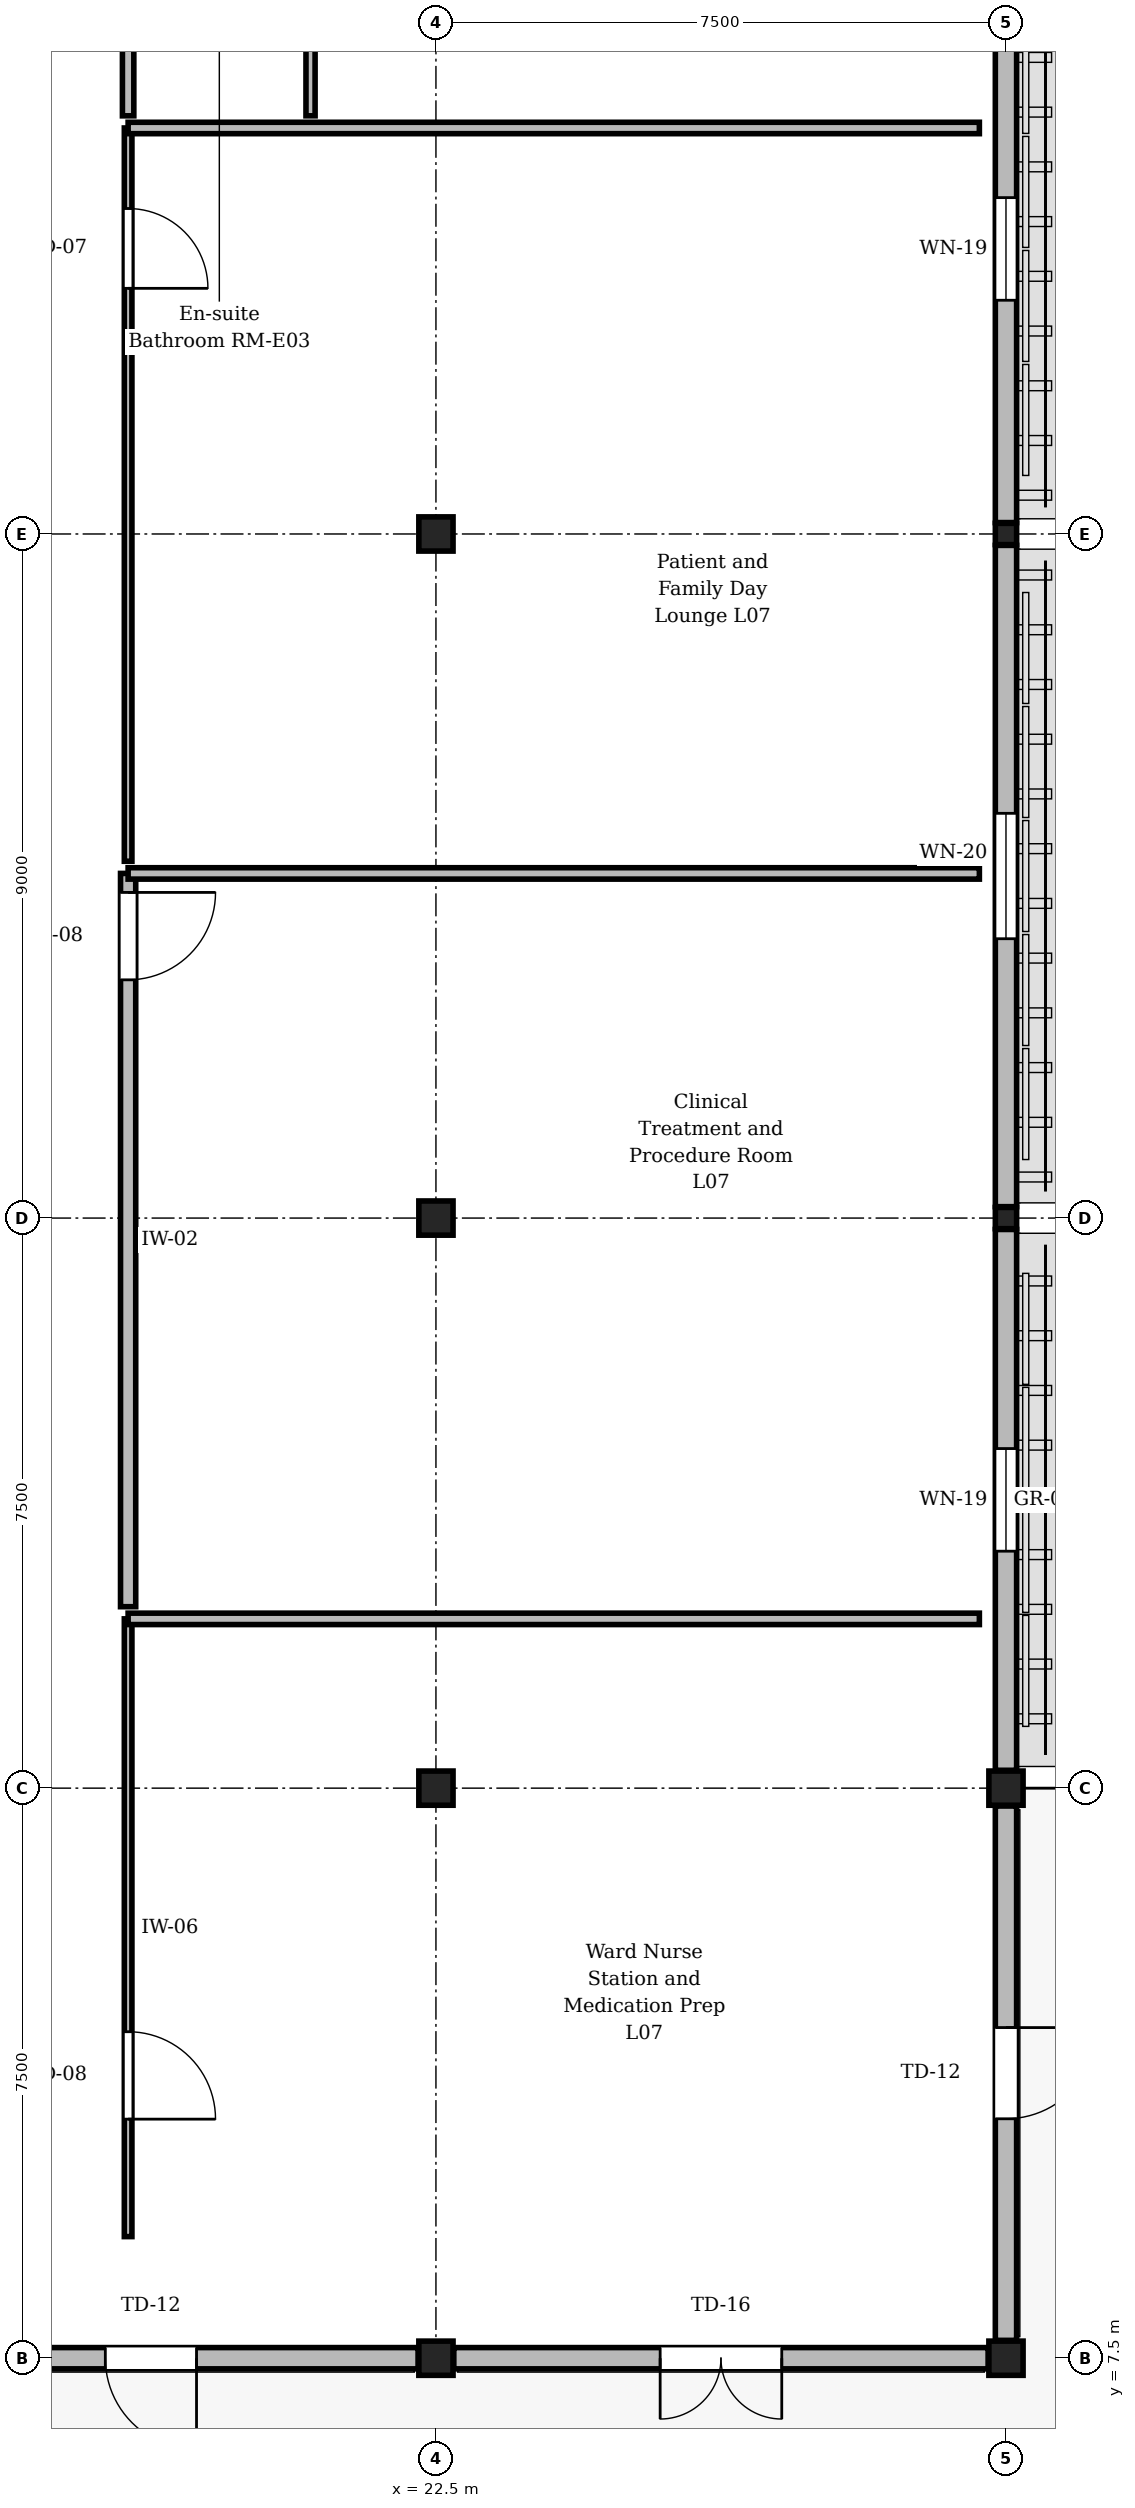
"""IFC4 building model, lengths in metres.
Left out: names, types, materials, properties, quantities, classifications, styles, units other than length and angle.
Written with IfcOpenShell. Run it as: python <this file> out.ifc"""

import sys

from ifc_helpers import new_model, si_unit, direction, frame, frame_2d, origin, origin_2d, place, context, subcontext, project, spatial, rectangle, extrude, element, fill, save


model = new_model("IFC4")
c1 = context("Model", 3, precision=1e-05, world=origin(), true_north=direction((0.0, 1.0)))
c2 = subcontext(c1, "Body", "Model", "MODEL_VIEW")
j1 = project(units=[si_unit("LENGTHUNIT", "METRE"), si_unit("PLANEANGLEUNIT", "RADIAN")], contexts=[c1])
p1 = place(None, origin())
s1 = spatial("IfcSite", under=j1, at=p1, CompositionType="ELEMENT")
p2 = place(p1, origin())
s2 = spatial("IfcBuilding", under=s1, at=p2, CompositionType="ELEMENT")
p3 = place(p2, frame((0.0, 0.0, 30.0)))
s3 = spatial("IfcBuildingStorey", under=s2, at=p3, CompositionType="ELEMENT", Elevation=30.0)
for number, where, z_axis, x_axis in (
    (1, (22.5, 7.5, 0.0), (0.0, 0.0, 1.0), (1.0, 0.0, 0.0)),
    (2, (22.5, 15.0, 0.0), (0.0, 0.0, 1.0), (1.0, 0.0, 0.0)),
    (3, (22.5, 22.5, 0.0), (0.0, 0.0, 1.0), (1.0, 0.0, 0.0)),
    (4, (22.5, 31.5, 0.0), (0.0, 0.0, 1.0), (1.0, 0.0, 0.0)),
    (5, (30.0, 7.5, 0.0), (0.0, 0.0, 1.0), (1.0, 0.0, 0.0)),
    (6, (30.0, 15.0, 0.0), (0.0, 0.0, 1.0), (1.0, 0.0, 0.0)),
):
    element("IfcColumn", number, at=place(p3, frame(where, z_axis=z_axis, x_axis=x_axis)), inside=s3, PredefinedType="COLUMN", context=c2, shape_type="SweptSolid", body=[
        extrude(rectangle(XDim=0.45, YDim=0.45, at=origin_2d()), origin(), (0.0, 0.0, 1.0), 4.05),
    ])
for number, where, z_axis, x_axis in (
    (7, (30.0, 22.5, 0.0), (0.0, 0.0, 1.0), (1.0, 0.0, 0.0)),
    (8, (30.0, 31.5, 0.0), (0.0, 0.0, 1.0), (1.0, 0.0, 0.0)),
):
    element("IfcColumn", number, at=place(p3, frame(where, z_axis=z_axis, x_axis=x_axis)), inside=s3, PredefinedType="COLUMN", context=c2, shape_type="SweptSolid", body=[
        extrude(rectangle(XDim=0.28, YDim=0.28, at=origin_2d()), origin(), (0.0, 0.0, 1.0), 4.05),
    ])
p4 = place(p3, frame((22.265, 7.5, 0.0), z_axis=(0.0, 0.0, 1.0), x_axis=(-1.0, 0.0, 0.0)))
e9 = element("IfcWall", 9, at=p4, inside=s3, PredefinedType="STANDARD", context=c2, shape_type="SweptSolid", body=[
    extrude(rectangle(XDim=7.03, YDim=0.28, at=frame_2d((3.515, 0.0))), origin(), (0.0, 0.0, 1.0), 3.23),
])
p5 = place(p4, frame((2.915, 0.0, 0.0)))
e10 = element("IfcOpeningElement", 10, at=p5, cuts=e9, PredefinedType="OPENING", context=c2, shape_type="SweptSolid", body=[
    extrude(rectangle(XDim=1.2, YDim=2.3, at=frame_2d((0.6, 1.15))), frame((0.0, 0.15, 0.0), z_axis=(0.0, -1.0, 0.0), x_axis=(1.0, 0.0, 0.0)), (0.0, 0.0, 1.0), 0.3),
])
p6 = place(p3, frame((29.765, 7.5, 0.0), z_axis=(0.0, 0.0, 1.0), x_axis=(-1.0, 0.0, 0.0)))
e11 = element("IfcWall", 11, at=p6, inside=s3, PredefinedType="STANDARD", context=c2, shape_type="SweptSolid", body=[
    extrude(rectangle(XDim=7.03, YDim=0.28, at=frame_2d((3.515, 0.0))), origin(), (0.0, 0.0, 1.0), 3.23),
])
p7 = place(p6, frame((2.715, 0.0, 0.0)))
e12 = element("IfcOpeningElement", 12, at=p7, cuts=e11, PredefinedType="OPENING", context=c2, shape_type="SweptSolid", body=[
    extrude(rectangle(XDim=1.6, YDim=2.35, at=frame_2d((0.8, 1.175))), frame((0.0, 0.15, 0.0), z_axis=(0.0, -1.0, 0.0), x_axis=(1.0, 0.0, 0.0)), (0.0, 0.0, 1.0), 0.3),
])
p8 = place(p3, frame((30.0, 14.765, 0.0), z_axis=(0.0, 0.0, 1.0), x_axis=(0.0, -1.0, 0.0)))
e13 = element("IfcWall", 13, at=p8, inside=s3, PredefinedType="STANDARD", context=c2, shape_type="SweptSolid", body=[
    extrude(rectangle(XDim=7.03, YDim=0.28, at=frame_2d((3.515, 0.0))), origin(), (0.0, 0.0, 1.0), 3.23),
])
p9 = place(p8, frame((2.915, 0.0, 0.0)))
e14 = element("IfcOpeningElement", 14, at=p9, cuts=e13, PredefinedType="OPENING", context=c2, shape_type="SweptSolid", body=[
    extrude(rectangle(XDim=1.2, YDim=2.3, at=frame_2d((0.6, 1.15))), frame((0.0, 0.15, 0.0), z_axis=(0.0, -1.0, 0.0), x_axis=(1.0, 0.0, 0.0)), (0.0, 0.0, 1.0), 0.3),
])
p10 = place(p3, frame((30.0, 22.35, 0.0), z_axis=(0.0, 0.0, 1.0), x_axis=(0.0, -1.0, 0.0)))
e15 = element("IfcWall", 15, at=p10, inside=s3, PredefinedType="STANDARD", context=c2, shape_type="SweptSolid", body=[
    extrude(rectangle(XDim=7.115, YDim=0.28, at=frame_2d((3.558, 0.0))), origin(), (0.0, 0.0, 1.0), 3.83),
])
p11 = place(p10, frame((2.883, 0.0, 0.85)))
e16 = element("IfcOpeningElement", 16, at=p11, cuts=e15, PredefinedType="OPENING", context=c2, shape_type="SweptSolid", body=[
    extrude(rectangle(XDim=1.35, YDim=2.25, at=frame_2d((0.675, 1.125))), frame((0.0, 0.15, 0.0), z_axis=(0.0, -1.0, 0.0), x_axis=(1.0, 0.0, 0.0)), (0.0, 0.0, 1.0), 0.3),
])
p12 = place(p3, frame((30.0, 31.35, 0.0), z_axis=(0.0, 0.0, 1.0), x_axis=(0.0, -1.0, 0.0)))
e17 = element("IfcWall", 17, at=p12, inside=s3, PredefinedType="STANDARD", context=c2, shape_type="SweptSolid", body=[
    extrude(rectangle(XDim=8.7, YDim=0.28, at=frame_2d((4.35, 0.0))), origin(), (0.0, 0.0, 1.0), 3.83),
])
p13 = place(p12, frame((3.525, 0.0, 0.85)))
e18 = element("IfcOpeningElement", 18, at=p13, cuts=e17, PredefinedType="OPENING", context=c2, shape_type="SweptSolid", body=[
    extrude(rectangle(XDim=1.65, YDim=2.25, at=frame_2d((0.825, 1.125))), frame((0.0, 0.15, 0.0), z_axis=(0.0, -1.0, 0.0), x_axis=(1.0, 0.0, 0.0)), (0.0, 0.0, 1.0), 0.3),
])
p14 = place(p3, frame((30.0, 38.85, 0.0), z_axis=(0.0, 0.0, 1.0), x_axis=(0.0, -1.0, 0.0)))
e19 = element("IfcWall", 19, at=p14, inside=s3, PredefinedType="STANDARD", context=c2, shape_type="SweptSolid", body=[
    extrude(rectangle(XDim=7.2, YDim=0.28, at=frame_2d((3.6, 0.0))), origin(), (0.0, 0.0, 1.0), 3.83),
])
p15 = place(p14, frame((2.925, 0.0, 0.85)))
e20 = element("IfcOpeningElement", 20, at=p15, cuts=e19, PredefinedType="OPENING", context=c2, shape_type="SweptSolid", body=[
    extrude(rectangle(XDim=1.35, YDim=2.25, at=frame_2d((0.675, 1.125))), frame((0.0, 0.15, 0.0), z_axis=(0.0, -1.0, 0.0), x_axis=(1.0, 0.0, 0.0)), (0.0, 0.0, 1.0), 0.3),
])
p16 = place(p3, frame((18.45, 17.227, 0.0), z_axis=(0.0, 0.0, 1.0), x_axis=(0.0, -1.0, 0.0)))
e21 = element("IfcWall", 21, at=p16, inside=s3, PredefinedType="PARTITIONING", context=c2, shape_type="SweptSolid", body=[
    extrude(rectangle(XDim=8.127, YDim=0.1, at=frame_2d((4.063, 0.0))), origin(), (0.0, 0.0, 1.0), 3.815),
])
p17 = place(p16, frame((5.432, 0.0, 0.0)))
e22 = element("IfcOpeningElement", 22, at=p17, cuts=e21, PredefinedType="OPENING", context=c2, shape_type="SweptSolid", body=[
    extrude(rectangle(XDim=1.15, YDim=2.2, at=frame_2d((0.575, 1.1))), frame((0.0, 0.06, 0.0), z_axis=(0.0, -1.0, 0.0), x_axis=(1.0, 0.0, 0.0)), (0.0, 0.0, 1.0), 0.12),
])
p18 = place(p3, frame((18.45, 27.034, 0.0), z_axis=(0.0, 0.0, 1.0), x_axis=(0.0, -1.0, 0.0)))
e23 = element("IfcWall", 23, at=p18, inside=s3, PredefinedType="STANDARD", context=c2, shape_type="SweptSolid", body=[
    extrude(rectangle(XDim=9.647, YDim=0.2, at=frame_2d((4.823, 0.0))), origin(), (0.0, 0.0, 1.0), 3.815),
])
p19 = place(p18, frame((0.25, 0.0, 0.0)))
e24 = element("IfcOpeningElement", 24, at=p19, cuts=e23, PredefinedType="OPENING", context=c2, shape_type="SweptSolid", body=[
    extrude(rectangle(XDim=1.15, YDim=2.2, at=frame_2d((0.575, 1.1))), frame((0.0, 0.11, 0.0), z_axis=(0.0, -1.0, 0.0), x_axis=(1.0, 0.0, 0.0)), (0.0, 0.0, 1.0), 0.22),
])
p20 = place(p3, frame((18.45, 36.841, 0.0), z_axis=(0.0, 0.0, 1.0), x_axis=(0.0, -1.0, 0.0)))
e25 = element("IfcWall", 25, at=p20, inside=s3, PredefinedType="PARTITIONING", context=c2, shape_type="SweptSolid", body=[
    extrude(rectangle(XDim=9.647, YDim=0.1, at=frame_2d((4.823, 0.0))), origin(), (0.0, 0.0, 1.0), 3.815),
])
p21 = place(p20, frame((1.06, 0.0, 0.0)))
e26 = element("IfcOpeningElement", 26, at=p21, cuts=e25, PredefinedType="OPENING", context=c2, shape_type="SweptSolid", body=[
    extrude(rectangle(XDim=1.05, YDim=2.2, at=frame_2d((0.525, 1.1))), frame((0.0, 0.06, 0.0), z_axis=(0.0, -1.0, 0.0), x_axis=(1.0, 0.0, 0.0)), (0.0, 0.0, 1.0), 0.12),
])
p22 = place(p3, frame((18.45, 46.649, 0.0), z_axis=(0.0, 0.0, 1.0), x_axis=(0.0, -1.0, 0.0)))
e27 = element("IfcWall", 27, at=p22, inside=s3, PredefinedType="PARTITIONING", context=c2, shape_type="SweptSolid", body=[
    extrude(rectangle(XDim=9.647, YDim=0.15, at=frame_2d((4.824, 0.0))), origin(), (0.0, 0.0, 1.0), 3.815),
])
p23 = place(p22, frame((3.369, 0.0, 0.0)))
e28 = element("IfcOpeningElement", 28, at=p23, cuts=e27, PredefinedType="OPENING", context=c2, shape_type="SweptSolid", body=[
    extrude(rectangle(XDim=1.35, YDim=2.25, at=frame_2d((0.675, 1.125))), frame((0.0, 0.085, 0.0), z_axis=(0.0, -1.0, 0.0), x_axis=(1.0, 0.0, 0.0)), (0.0, 0.0, 1.0), 0.17),
])
p24 = place(p3, frame((20.85, 37.001, 0.0), z_axis=(0.0, 0.0, 1.0), x_axis=(0.0, 1.0, 0.0)))
e29 = element("IfcWall", 29, at=p24, inside=s3, PredefinedType="PARTITIONING", context=c2, shape_type="SweptSolid", body=[
    extrude(rectangle(XDim=2.0, YDim=0.12, at=frame_2d((1.0, 0.0))), origin(), (0.0, 0.0, 1.0), 3.815),
])
for number, where, z_axis, x_axis in (
    (30, (18.45, 17.227, 0.0), (0.0, 0.0, 1.0), (1.0, 0.0, 0.0)),
    (31, (18.45, 27.034, 0.0), (0.0, 0.0, 1.0), (1.0, 0.0, 0.0)),
    (32, (18.45, 36.841, 0.0), (0.0, 0.0, 1.0), (1.0, 0.0, 0.0)),
):
    element("IfcWall", number, at=place(p3, frame(where, z_axis=z_axis, x_axis=x_axis)), inside=s3, PredefinedType="PARTITIONING", context=c2, shape_type="SweptSolid", body=[
        extrude(rectangle(XDim=11.2, YDim=0.15, at=frame_2d((5.6, 0.0))), origin(), (0.0, 0.0, 1.0), 3.815),
    ])
p25 = place(p5, origin())
e33 = element("IfcDoor", 33, at=p25, inside=s3, OperationType="SINGLE_SWING_LEFT", PredefinedType="DOOR", context=c2, shape_type="SweptSolid", body=[
    extrude(rectangle(XDim=1.2, YDim=2.3, at=frame_2d((0.6, 1.15))), frame((0.0, 0.025, 0.0), z_axis=(0.0, -1.0, 0.0), x_axis=(1.0, 0.0, 0.0)), (0.0, 0.0, 1.0), 0.05),
])
fill(e10, e33)
p26 = place(p7, origin())
e34 = element("IfcDoor", 34, at=p26, inside=s3, OperationType="DOUBLE_DOOR_SINGLE_SWING", PredefinedType="DOOR", context=c2, shape_type="SweptSolid", body=[
    extrude(rectangle(XDim=1.6, YDim=2.35, at=frame_2d((0.8, 1.175))), frame((0.0, 0.025, 0.0), z_axis=(0.0, -1.0, 0.0), x_axis=(1.0, 0.0, 0.0)), (0.0, 0.0, 1.0), 0.05),
])
fill(e12, e34)
p27 = place(p9, origin())
e35 = element("IfcDoor", 35, at=p27, inside=s3, OperationType="SINGLE_SWING_LEFT", PredefinedType="DOOR", context=c2, shape_type="SweptSolid", body=[
    extrude(rectangle(XDim=1.2, YDim=2.3, at=frame_2d((0.6, 1.15))), frame((0.0, 0.025, 0.0), z_axis=(0.0, -1.0, 0.0), x_axis=(1.0, 0.0, 0.0)), (0.0, 0.0, 1.0), 0.05),
])
fill(e14, e35)
p28 = place(p11, origin())
e36 = element("IfcWindow", 36, at=p28, inside=s3, PartitioningType="SINGLE_PANEL", PredefinedType="WINDOW", context=c2, shape_type="SweptSolid", body=[
    extrude(rectangle(XDim=1.35, YDim=2.25, at=frame_2d((0.675, 1.125))), frame((0.0, 0.03, 0.0), z_axis=(0.0, -1.0, 0.0), x_axis=(1.0, 0.0, 0.0)), (0.0, 0.0, 1.0), 0.06),
])
fill(e16, e36)
p29 = place(p13, origin())
e37 = element("IfcWindow", 37, at=p29, inside=s3, PartitioningType="SINGLE_PANEL", PredefinedType="WINDOW", context=c2, shape_type="SweptSolid", body=[
    extrude(rectangle(XDim=1.65, YDim=2.25, at=frame_2d((0.825, 1.125))), frame((0.0, 0.03, 0.0), z_axis=(0.0, -1.0, 0.0), x_axis=(1.0, 0.0, 0.0)), (0.0, 0.0, 1.0), 0.06),
])
fill(e18, e37)
p30 = place(p15, origin())
e38 = element("IfcWindow", 38, at=p30, inside=s3, PartitioningType="SINGLE_PANEL", PredefinedType="WINDOW", context=c2, shape_type="SweptSolid", body=[
    extrude(rectangle(XDim=1.35, YDim=2.25, at=frame_2d((0.675, 1.125))), frame((0.0, 0.03, 0.0), z_axis=(0.0, -1.0, 0.0), x_axis=(1.0, 0.0, 0.0)), (0.0, 0.0, 1.0), 0.06),
])
fill(e20, e38)
p31 = place(p17, origin())
e39 = element("IfcDoor", 39, at=p31, inside=s3, OperationType="SINGLE_SWING_RIGHT", PredefinedType="DOOR", context=c2, shape_type="SweptSolid", body=[
    extrude(rectangle(XDim=1.15, YDim=2.2, at=frame_2d((0.575, 1.1))), frame((0.0, 0.025, 0.0), z_axis=(0.0, -1.0, 0.0), x_axis=(1.0, 0.0, 0.0)), (0.0, 0.0, 1.0), 0.05),
])
fill(e22, e39)
p32 = place(p19, origin())
e40 = element("IfcDoor", 40, at=p32, inside=s3, OperationType="SINGLE_SWING_LEFT", PredefinedType="DOOR", context=c2, shape_type="SweptSolid", body=[
    extrude(rectangle(XDim=1.15, YDim=2.2, at=frame_2d((0.575, 1.1))), frame((0.0, 0.025, 0.0), z_axis=(0.0, -1.0, 0.0), x_axis=(1.0, 0.0, 0.0)), (0.0, 0.0, 1.0), 0.05),
])
fill(e24, e40)
p33 = place(p21, origin())
e41 = element("IfcDoor", 41, at=p33, inside=s3, OperationType="SINGLE_SWING_RIGHT", PredefinedType="DOOR", context=c2, shape_type="SweptSolid", body=[
    extrude(rectangle(XDim=1.05, YDim=2.2, at=frame_2d((0.525, 1.1))), frame((0.0, 0.025, 0.0), z_axis=(0.0, -1.0, 0.0), x_axis=(1.0, 0.0, 0.0)), (0.0, 0.0, 1.0), 0.05),
])
fill(e26, e41)
save(model, sys.argv[1])
